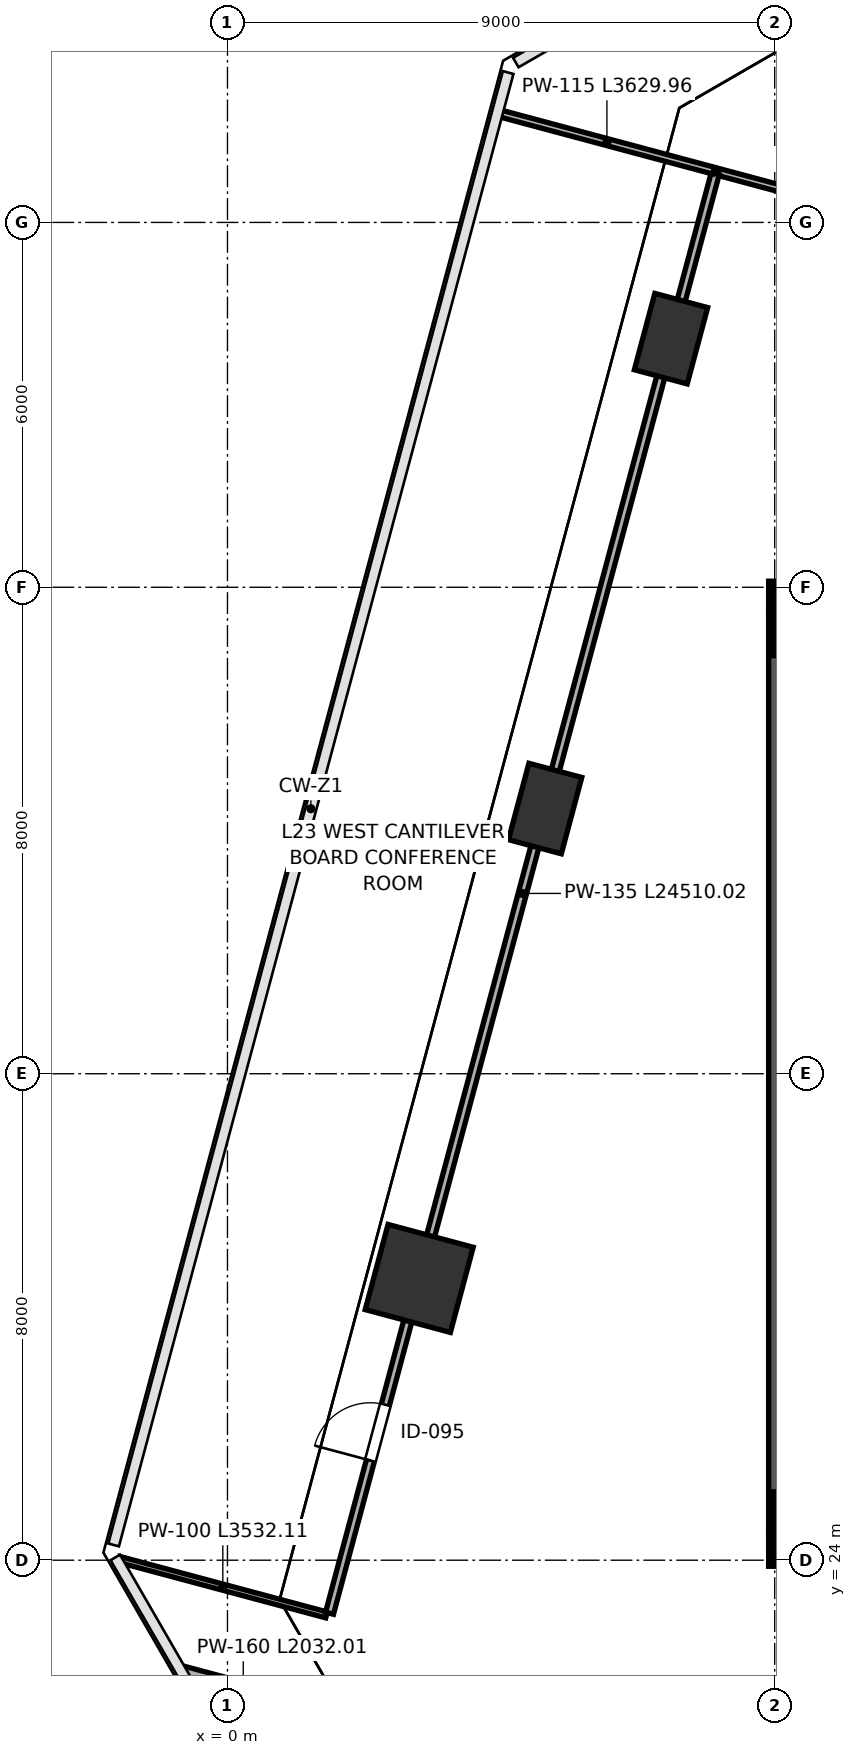
"""IFC4 building model, lengths in metres.
Left out: names, types, materials, properties, quantities, classifications, styles, units other than length and angle.
Written with IfcOpenShell. Run it as: python <this file> out.ifc"""

import sys

from ifc_helpers import new_model, si_unit, direction, frame, frame_2d, origin, origin_2d, place, context, subcontext, project, spatial, rectangle, extrude, clip, halfspace, source, transform, mapped, element, fill, save


model = new_model("IFC4")
c1 = context("Model", 3, precision=1e-05, world=origin(), true_north=direction((0.0, 1.0)))
c2 = subcontext(c1, "Body", "Model", "MODEL_VIEW")
j1 = project(units=[si_unit("LENGTHUNIT", "METRE"), si_unit("PLANEANGLEUNIT", "RADIAN")], contexts=[c1])
p1 = place(None, origin())
s1 = spatial("IfcSite", under=j1, at=p1, CompositionType="ELEMENT")
p2 = place(p1, origin())
s2 = spatial("IfcBuilding", under=s1, at=p2, CompositionType="ELEMENT")
p3 = place(p2, frame((0.0, 0.0, 104.2)))
s3 = spatial("IfcBuildingStorey", under=s2, at=p3, CompositionType="ELEMENT", Elevation=104.2)
m1 = source(origin(), c2, "Body", "SweptSolid", [
    extrude(rectangle(XDim=1.15, YDim=1.15, at=origin_2d()), origin(), (0.0, 0.0, 1.0), 4.198),
])
for number, where, z_axis, x_axis in (
    (1, (9.55, 24.55, 0.001), (0.0, 0.0, 1.0), (1.0, 0.0, 0.0)),
    (2, (9.55, 39.45, 0.001), (0.0, 0.0, 1.0), (1.0, 0.0, 0.0)),
):
    element("IfcColumn", number, at=place(p3, frame(where, z_axis=z_axis, x_axis=x_axis)), inside=s3, PredefinedType="COLUMN", context=c2, shape_type="MappedRepresentation", body=[
        mapped(m1, transform((0.0, 0.0, 0.0), scale=1.0)),
    ])
p4 = place(p3, frame((3.154, 28.634, 0.0), z_axis=(-0.016373995862, 0.095003891187, 0.995342229044), x_axis=(0.995646203218, -0.089811292785, 0.024951346757)))
e3 = element("IfcColumn", 3, at=p4, inside=s3, PredefinedType="COLUMN", context=c2, shape_type="Clipping", body=[
    clip(clip(extrude(rectangle(XDim=1.45, YDim=1.45, at=origin_2d()), origin(), (0.0, 0.0, 1.0), 4.22), halfspace(frame((0.0, 0.0, 0.087), z_axis=(0.0, 0.0, -1.0), x_axis=(1.0, 0.0, 0.0)), False)), halfspace(frame((0.0, 0.0, 4.133), z_axis=(0.0, 0.0, 1.0), x_axis=(1.0, 0.0, 0.0)), False)),
])
p5 = place(p3, frame((5.224, 36.361, 0.0), z_axis=(0.023510644538, 0.083966587636, 0.996191177312), x_axis=(0.860632256637, -0.508726650715, 0.022567979268)))
e4 = element("IfcColumn", 4, at=p5, inside=s3, PredefinedType="PILASTER", context=c2, shape_type="Clipping", body=[
    clip(clip(extrude(rectangle(XDim=0.9, YDim=1.3, at=origin_2d()), origin(), (0.0, 0.0, 1.0), 4.216), halfspace(frame((0.0, 0.0, 0.066), z_axis=(0.0, 0.0, -1.0), x_axis=(1.0, 0.0, 0.0)), False)), halfspace(frame((0.0, 0.0, 4.15), z_axis=(0.0, 0.0, 1.0), x_axis=(1.0, 0.0, 0.0)), False)),
])
p6 = place(p3, frame((7.295, 44.088, 0.0), z_axis=(0.063297021614, 0.072785789023, 0.995336986136), x_axis=(0.559820742609, -0.828237566944, 0.02496535295)))
e5 = element("IfcColumn", 5, at=p6, inside=s3, PredefinedType="PILASTER", context=c2, shape_type="Clipping", body=[
    clip(clip(extrude(rectangle(XDim=0.9, YDim=1.3, at=origin_2d()), origin(), (0.0, 0.0, 1.0), 4.22), halfspace(frame((0.0, 0.0, 0.073), z_axis=(0.0, 0.0, -1.0), x_axis=(1.0, 0.0, 0.0)), False)), halfspace(frame((0.0, 0.0, 4.147), z_axis=(0.0, 0.0, 1.0), x_axis=(1.0, 0.0, 0.0)), False)),
])
p7 = place(p3, frame((9.175, 24.45, 0.0), z_axis=(0.0, 0.0, 1.0), x_axis=(0.0, 1.0, 0.0)))
e6 = element("IfcWall", 6, at=p7, inside=s3, PredefinedType="SHEAR", context=c2, shape_type="SweptSolid", body=[
    extrude(rectangle(XDim=15.1, YDim=0.55, at=frame_2d((7.55, 0.0))), origin(), (0.0, 0.0, 1.0), 3.96),
])
for number, where, z_axis, x_axis in (
    (7, (8.9, 24.175, 0.0), (0.0, 0.0, 1.0), (1.0, 0.0, 0.0)),
    (8, (8.9, 39.825, 0.0), (0.0, 0.0, 1.0), (1.0, 0.0, 0.0)),
):
    element("IfcWall", number, at=place(p3, frame(where, z_axis=z_axis, x_axis=x_axis)), inside=s3, PredefinedType="SHEAR", context=c2, shape_type="SweptSolid", body=[
        extrude(rectangle(XDim=18.2, YDim=0.55, at=frame_2d((9.1, 0.0))), origin(), (0.0, 0.0, 1.0), 3.96),
    ])
p8 = place(p3, frame((-0.722, 22.177, 0.0), z_axis=(0.0, 0.0, 1.0), x_axis=(0.965965207833, -0.258672026426, 0.0)))
e9 = element("IfcWall", 9, at=p8, inside=s3, PredefinedType="PARTITIONING", context=c2, shape_type="SweptSolid", body=[
    extrude(rectangle(XDim=2.032, YDim=0.16, at=frame_2d((1.016, 0.0))), origin(), (0.0, 0.0, 1.0), 3.96),
])
p9 = place(p3, frame((8.071, 46.831, 0.0), z_axis=(0.0, 0.0, 1.0), x_axis=(0.965925848141, -0.258818963551, 0.0)))
e10 = element("IfcWall", 10, at=p9, inside=s3, PredefinedType="PARTITIONING", context=c2, shape_type="SweptSolid", body=[
    extrude(rectangle(XDim=26.16, YDim=0.115, at=frame_2d((13.08, 0.0))), origin(), (0.0, 0.0, 1.0), 3.96),
])
p10 = place(p9, frame((1.05, 0.0, 0.0)))
e11 = element("IfcOpeningElement", 11, at=p10, cuts=e10, PredefinedType="OPENING", context=c2, shape_type="SweptSolid", body=[
    extrude(rectangle(XDim=0.95, YDim=2.15, at=frame_2d((0.475, 1.075))), frame((0.0, 0.067, 0.0), z_axis=(0.0, -1.0, 0.0), x_axis=(1.0, 0.0, 0.0)), (0.0, 0.0, 1.0), 0.135),
])
p11 = place(p3, frame((-1.782, 24.014, 0.0), z_axis=(0.0, 0.0, 1.0), x_axis=(0.965936019953, -0.258780998834, 0.0)))
e12 = element("IfcWall", 12, at=p11, inside=s3, PredefinedType="PARTITIONING", context=c2, shape_type="SweptSolid", body=[
    extrude(rectangle(XDim=3.532, YDim=0.1, at=frame_2d((1.766, 0.0))), origin(), (0.0, 0.0, 1.0), 3.96),
])
p12 = place(p3, frame((1.678, 23.128, 0.0), z_axis=(0.0, 0.0, 1.0), x_axis=(0.258813756198, 0.965927243431, 0.0)))
e13 = element("IfcWall", 13, at=p12, inside=s3, PredefinedType="PARTITIONING", context=c2, shape_type="SweptSolid", body=[
    extrude(rectangle(XDim=24.51, YDim=0.135, at=frame_2d((12.255, 0.0))), origin(), (0.0, 0.0, 1.0), 2.795),
])
p13 = place(p12, frame((2.6, 0.0, 0.0)))
e14 = element("IfcOpeningElement", 14, at=p13, cuts=e13, PredefinedType="OPENING", context=c2, shape_type="SweptSolid", body=[
    extrude(rectangle(XDim=0.95, YDim=2.15, at=frame_2d((0.475, 1.075))), frame((0.0, 0.078, 0.0), z_axis=(0.0, -1.0, 0.0), x_axis=(1.0, 0.0, 0.0)), (0.0, 0.0, 1.0), 0.155),
])
p14 = place(p3, frame((4.487, 47.791, 0.0), z_axis=(0.0, 0.0, 1.0), x_axis=(0.965930639999, -0.258801079426, 0.0)))
e15 = element("IfcWall", 15, at=p14, inside=s3, PredefinedType="PARTITIONING", context=c2, shape_type="SweptSolid", body=[
    extrude(rectangle(XDim=3.63, YDim=0.115, at=frame_2d((1.815, 0.0))), origin(), (0.0, 0.0, 1.0), 3.96),
])
m2 = source(origin(), c2, "Body", "SweptSolid", [
    extrude(rectangle(XDim=0.95, YDim=2.15, at=frame_2d((0.475, 1.075))), frame((0.0, 0.025, 0.0), z_axis=(0.0, -1.0, 0.0), x_axis=(1.0, 0.0, 0.0)), (0.0, 0.0, 1.0), 0.05),
])
p15 = place(p13, origin())
e16 = element("IfcDoor", 16, at=p15, inside=s3, OperationType="SINGLE_SWING_LEFT", PredefinedType="DOOR", context=c2, shape_type="MappedRepresentation", body=[
    mapped(m2, transform((0.0, 0.0, 0.0), scale=1.0)),
])
fill(e14, e16)
save(model, sys.argv[1])
